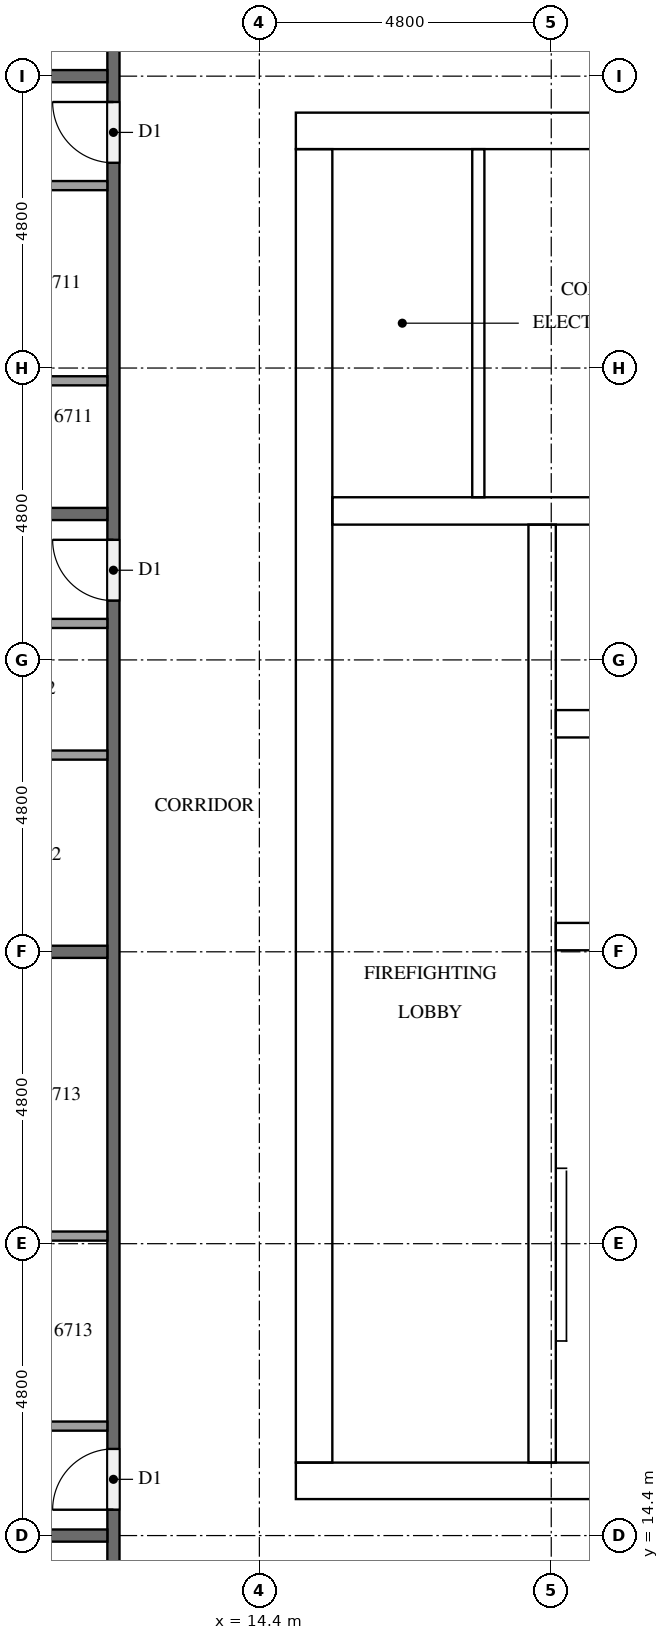
"""IFC4 building model, lengths in metres.
Left out: names, types, materials, properties, quantities, classifications, styles, units other than length and angle.
Written with IfcOpenShell. Run it as: python <this file> out.ifc"""

import sys

from ifc_helpers import new_model, si_unit, direction, frame, frame_2d, origin, place, context, subcontext, project, spatial, rectangle, extrude, element, fill, save


model = new_model("IFC4")
c1 = context("Model", 3, precision=1e-05, world=origin(), true_north=direction((0.0, 1.0)))
c2 = subcontext(c1, "Body", "Model", "MODEL_VIEW")
j1 = project(units=[si_unit("LENGTHUNIT", "METRE"), si_unit("PLANEANGLEUNIT", "RADIAN")], contexts=[c1])
p1 = place(None, origin())
s1 = spatial("IfcSite", under=j1, at=p1, CompositionType="ELEMENT")
p2 = place(p1, origin())
s2 = spatial("IfcBuilding", under=s1, at=p2, CompositionType="ELEMENT")
p3 = place(p2, frame((0.0, 0.0, 256.2)))
s3 = spatial("IfcBuildingStorey", under=s2, at=p3, CompositionType="ELEMENT", Elevation=256.2)
p4 = place(p3, frame((15.0, 15.3, 0.0), z_axis=(0.0, 0.0, 1.0), x_axis=(1.0, 0.0, 0.0)))
e1 = element("IfcWall", 1, at=p4, inside=s3, PredefinedType="SHEAR", context=c2, shape_type="SweptSolid", body=[
    extrude(rectangle(XDim=32.4, YDim=0.6, at=frame_2d((16.2, 0.0))), origin(), (0.0, 0.0, 1.0), 3.2),
])
p5 = place(p4, frame((15.3, 0.0, 0.0)))
e2 = element("IfcOpeningElement", 2, at=p5, cuts=e1, PredefinedType="OPENING", context=c2, shape_type="SweptSolid", body=[
    extrude(rectangle(XDim=1.8, YDim=2.1, at=frame_2d((0.9, 1.05))), frame((0.0, 0.31, 0.0), z_axis=(0.0, -1.0, 0.0), x_axis=(1.0, 0.0, 0.0)), (0.0, 0.0, 1.0), 0.62),
])
p6 = place(p3, frame((15.0, 37.5, 0.0), z_axis=(0.0, 0.0, 1.0), x_axis=(1.0, 0.0, 0.0)))
e3 = element("IfcWall", 3, at=p6, inside=s3, PredefinedType="SHEAR", context=c2, shape_type="SweptSolid", body=[
    extrude(rectangle(XDim=32.4, YDim=0.6, at=frame_2d((16.2, 0.0))), origin(), (0.0, 0.0, 1.0), 3.2),
])
p7 = place(p6, frame((15.3, 0.0, 0.0)))
e4 = element("IfcOpeningElement", 4, at=p7, cuts=e3, PredefinedType="OPENING", context=c2, shape_type="SweptSolid", body=[
    extrude(rectangle(XDim=1.8, YDim=2.1, at=frame_2d((0.9, 1.05))), frame((0.0, 0.31, 0.0), z_axis=(0.0, -1.0, 0.0), x_axis=(1.0, 0.0, 0.0)), (0.0, 0.0, 1.0), 0.62),
])
p8 = place(p6, frame((1.25, 0.0, 0.0)))
e5 = element("IfcOpeningElement", 5, at=p8, cuts=e3, PredefinedType="OPENING", context=c2, shape_type="SweptSolid", body=[
    extrude(rectangle(XDim=1.0, YDim=2.1, at=frame_2d((0.5, 1.05))), frame((0.0, 0.31, 0.0), z_axis=(0.0, -1.0, 0.0), x_axis=(1.0, 0.0, 0.0)), (0.0, 0.0, 1.0), 0.62),
])
p9 = place(p6, frame((4.988, 0.0, 0.0)))
e6 = element("IfcOpeningElement", 6, at=p9, cuts=e3, PredefinedType="OPENING", context=c2, shape_type="SweptSolid", body=[
    extrude(rectangle(XDim=1.0, YDim=2.1, at=frame_2d((0.5, 1.05))), frame((0.0, 0.31, 0.0), z_axis=(0.0, -1.0, 0.0), x_axis=(1.0, 0.0, 0.0)), (0.0, 0.0, 1.0), 0.62),
])
p10 = place(p3, frame((15.3, 15.6, 0.0), z_axis=(0.0, 0.0, 1.0), x_axis=(0.0, 1.0, 0.0)))
e7 = element("IfcWall", 7, at=p10, inside=s3, PredefinedType="SHEAR", context=c2, shape_type="SweptSolid", body=[
    extrude(rectangle(XDim=21.6, YDim=0.6, at=frame_2d((10.8, 0.0))), origin(), (0.0, 0.0, 1.0), 3.2),
])
p11 = place(p10, frame((5.16, 0.0, 0.0)))
e8 = element("IfcOpeningElement", 8, at=p11, cuts=e7, PredefinedType="OPENING", context=c2, shape_type="SweptSolid", body=[
    extrude(rectangle(XDim=1.2, YDim=2.1, at=frame_2d((0.6, 1.05))), frame((0.0, 0.31, 0.0), z_axis=(0.0, -1.0, 0.0), x_axis=(1.0, 0.0, 0.0)), (0.0, 0.0, 1.0), 0.62),
])
p12 = place(p3, frame((19.05, 15.6, 0.0), z_axis=(0.0, 0.0, 1.0), x_axis=(0.0, 1.0, 0.0)))
e9 = element("IfcWall", 9, at=p12, inside=s3, PredefinedType="SHEAR", context=c2, shape_type="SweptSolid", body=[
    extrude(rectangle(XDim=15.425, YDim=0.45, at=frame_2d((7.712, 0.0))), origin(), (0.0, 0.0, 1.0), 3.2),
])
p13 = place(p12, frame((9.85, 0.0, 0.0)))
e10 = element("IfcOpeningElement", 10, at=p13, cuts=e9, PredefinedType="OPENING", context=c2, shape_type="SweptSolid", body=[
    extrude(rectangle(XDim=1.1, YDim=2.1, at=frame_2d((0.55, 1.05))), frame((0.0, 0.235, 0.0), z_axis=(0.0, -1.0, 0.0), x_axis=(1.0, 0.0, 0.0)), (0.0, 0.0, 1.0), 0.47),
])
p14 = place(p12, frame((13.35, 0.0, 0.0)))
e11 = element("IfcOpeningElement", 11, at=p14, cuts=e9, PredefinedType="OPENING", context=c2, shape_type="SweptSolid", body=[
    extrude(rectangle(XDim=1.1, YDim=2.1, at=frame_2d((0.55, 1.05))), frame((0.0, 0.235, 0.0), z_axis=(0.0, -1.0, 0.0), x_axis=(1.0, 0.0, 0.0)), (0.0, 0.0, 1.0), 0.47),
])
p15 = place(p12, frame((0.6, 0.0, 0.0)))
e12 = element("IfcOpeningElement", 12, at=p15, cuts=e9, PredefinedType="OPENING", context=c2, shape_type="SweptSolid", body=[
    extrude(rectangle(XDim=1.2, YDim=2.1, at=frame_2d((0.6, 1.05))), frame((0.0, 0.235, 0.0), z_axis=(0.0, -1.0, 0.0), x_axis=(1.0, 0.0, 0.0)), (0.0, 0.0, 1.0), 0.47),
])
for number, where, z_axis, x_axis in (
    (13, (19.275, 24.25, 0.0), (0.0, 0.0, 1.0), (1.0, 0.0, 0.0)),
    (14, (19.275, 27.75, 0.0), (0.0, 0.0, 1.0), (1.0, 0.0, 0.0)),
):
    element("IfcWall", number, at=place(p3, frame(where, z_axis=z_axis, x_axis=x_axis)), inside=s3, PredefinedType="SHEAR", context=c2, shape_type="SweptSolid", body=[
        extrude(rectangle(XDim=3.6, YDim=0.45, at=frame_2d((1.8, 0.0))), origin(), (0.0, 0.0, 1.0), 3.2),
    ])
p16 = place(p3, frame((15.6, 31.25, 0.0), z_axis=(0.0, 0.0, 1.0), x_axis=(1.0, 0.0, 0.0)))
e15 = element("IfcWall", 15, at=p16, inside=s3, PredefinedType="SHEAR", context=c2, shape_type="SweptSolid", body=[
    extrude(rectangle(XDim=7.275, YDim=0.45, at=frame_2d((3.637, 0.0))), origin(), (0.0, 0.0, 1.0), 3.2),
])
p17 = place(p3, frame((18.001, 31.475, 0.0), z_axis=(0.0, 0.0, 1.0), x_axis=(0.0, 1.0, 0.0)))
e16 = element("IfcWall", 16, at=p17, inside=s3, PredefinedType="PARTITIONING", context=c2, shape_type="SweptSolid", body=[
    extrude(rectangle(XDim=5.725, YDim=0.2, at=frame_2d((2.862, 0.0))), origin(), (0.0, 0.0, 1.0), 3.2),
])
p18 = place(p3, frame((12.0, 12.1, 0.0), z_axis=(0.0, 0.0, 1.0), x_axis=(0.0, 1.0, 0.0)))
e17 = element("IfcWall", 17, at=p18, inside=s3, PredefinedType="PARTITIONING", context=c2, shape_type="SweptSolid", body=[
    extrude(rectangle(XDim=28.6, YDim=0.2, at=frame_2d((14.3, 0.0))), origin(), (0.0, 0.0, 1.0), 3.2),
])
p19 = place(p18, frame((26.725, 0.0, 0.0)))
e18 = element("IfcOpeningElement", 18, at=p19, cuts=e17, PredefinedType="OPENING", context=c2, shape_type="SweptSolid", body=[
    extrude(rectangle(XDim=1.0, YDim=2.1, at=frame_2d((0.5, 1.05))), frame((0.0, 0.11, 0.0), z_axis=(0.0, -1.0, 0.0), x_axis=(1.0, 0.0, 0.0)), (0.0, 0.0, 1.0), 0.22),
])
p20 = place(p18, frame((24.875, 0.0, 0.0)))
e19 = element("IfcOpeningElement", 19, at=p20, cuts=e17, PredefinedType="OPENING", context=c2, shape_type="SweptSolid", body=[
    extrude(rectangle(XDim=1.0, YDim=2.1, at=frame_2d((0.5, 1.05))), frame((0.0, 0.11, 0.0), z_axis=(0.0, -1.0, 0.0), x_axis=(1.0, 0.0, 0.0)), (0.0, 0.0, 1.0), 0.22),
])
p21 = place(p18, frame((17.675, 0.0, 0.0)))
e20 = element("IfcOpeningElement", 20, at=p21, cuts=e17, PredefinedType="OPENING", context=c2, shape_type="SweptSolid", body=[
    extrude(rectangle(XDim=1.0, YDim=2.1, at=frame_2d((0.5, 1.05))), frame((0.0, 0.11, 0.0), z_axis=(0.0, -1.0, 0.0), x_axis=(1.0, 0.0, 0.0)), (0.0, 0.0, 1.0), 0.22),
])
p22 = place(p18, frame((2.725, 0.0, 0.0)))
e21 = element("IfcOpeningElement", 21, at=p22, cuts=e17, PredefinedType="OPENING", context=c2, shape_type="SweptSolid", body=[
    extrude(rectangle(XDim=1.0, YDim=2.1, at=frame_2d((0.5, 1.05))), frame((0.0, 0.11, 0.0), z_axis=(0.0, -1.0, 0.0), x_axis=(1.0, 0.0, 0.0)), (0.0, 0.0, 1.0), 0.22),
])
p23 = place(p18, frame((0.875, 0.0, 0.0)))
e22 = element("IfcOpeningElement", 22, at=p23, cuts=e17, PredefinedType="OPENING", context=c2, shape_type="SweptSolid", body=[
    extrude(rectangle(XDim=1.0, YDim=2.1, at=frame_2d((0.5, 1.05))), frame((0.0, 0.11, 0.0), z_axis=(0.0, -1.0, 0.0), x_axis=(1.0, 0.0, 0.0)), (0.0, 0.0, 1.0), 0.22),
])
p24 = place(p3, frame((0.275, 38.4, 0.0), z_axis=(0.0, 0.0, 1.0), x_axis=(1.0, 0.0, 0.0)))
e23 = element("IfcWall", 23, at=p24, inside=s3, PredefinedType="PARTITIONING", context=c2, shape_type="SweptSolid", body=[
    extrude(rectangle(XDim=11.625, YDim=0.2, at=frame_2d((5.812, 0.0))), origin(), (0.0, 0.0, 1.0), 3.2),
])
for number, where, z_axis, x_axis in (
    (24, (0.1, 31.2, 0.0), (0.0, 0.0, 1.0), (1.0, 0.0, 0.0)),
    (25, (0.1, 24.0, 0.0), (0.0, 0.0, 1.0), (1.0, 0.0, 0.0)),
    (26, (0.1, 14.4, 0.0), (0.0, 0.0, 1.0), (1.0, 0.0, 0.0)),
):
    element("IfcWall", number, at=place(p3, frame(where, z_axis=z_axis, x_axis=x_axis)), inside=s3, PredefinedType="PARTITIONING", context=c2, shape_type="SweptSolid", body=[
        extrude(rectangle(XDim=11.8, YDim=0.2, at=frame_2d((5.9, 0.0))), origin(), (0.0, 0.0, 1.0), 3.2),
    ])
p25 = place(p3, frame((11.9, 33.39, 0.0), z_axis=(0.0, 0.0, 1.0), x_axis=(-1.0, 0.0, 0.0)))
e27 = element("IfcWall", 27, at=p25, inside=s3, PredefinedType="PARTITIONING", context=c2, shape_type="SweptSolid", body=[
    extrude(rectangle(XDim=2.975, YDim=0.15, at=frame_2d((1.487, 0.0))), origin(), (0.0, 0.0, 1.0), 3.2),
])
p26 = place(p3, frame((11.9, 36.6, 0.0), z_axis=(0.0, 0.0, 1.0), x_axis=(-1.0, 0.0, 0.0)))
e28 = element("IfcWall", 28, at=p26, inside=s3, PredefinedType="PARTITIONING", context=c2, shape_type="SweptSolid", body=[
    extrude(rectangle(XDim=3.125, YDim=0.15, at=frame_2d((1.562, 0.0))), origin(), (0.0, 0.0, 1.0), 3.2),
])
p27 = place(p3, frame((11.9, 27.235, 0.0), z_axis=(0.0, 0.0, 1.0), x_axis=(-1.0, 0.0, 0.0)))
e29 = element("IfcWall", 29, at=p27, inside=s3, PredefinedType="PARTITIONING", context=c2, shape_type="SweptSolid", body=[
    extrude(rectangle(XDim=4.175, YDim=0.15, at=frame_2d((2.087, 0.0))), origin(), (0.0, 0.0, 1.0), 3.2),
])
p28 = place(p3, frame((11.9, 29.4, 0.0), z_axis=(0.0, 0.0, 1.0), x_axis=(-1.0, 0.0, 0.0)))
e30 = element("IfcWall", 30, at=p28, inside=s3, PredefinedType="PARTITIONING", context=c2, shape_type="SweptSolid", body=[
    extrude(rectangle(XDim=4.325, YDim=0.15, at=frame_2d((2.163, 0.0))), origin(), (0.0, 0.0, 1.0), 3.2),
])
p29 = place(p3, frame((11.9, 19.325, 0.0), z_axis=(0.0, 0.0, 1.0), x_axis=(-1.0, 0.0, 0.0)))
e31 = element("IfcWall", 31, at=p29, inside=s3, PredefinedType="PARTITIONING", context=c2, shape_type="SweptSolid", body=[
    extrude(rectangle(XDim=2.975, YDim=0.15, at=frame_2d((1.487, 0.0))), origin(), (0.0, 0.0, 1.0), 3.2),
])
p30 = place(p3, frame((11.9, 16.2, 0.0), z_axis=(0.0, 0.0, 1.0), x_axis=(-1.0, 0.0, 0.0)))
e32 = element("IfcWall", 32, at=p30, inside=s3, PredefinedType="PARTITIONING", context=c2, shape_type="SweptSolid", body=[
    extrude(rectangle(XDim=3.125, YDim=0.15, at=frame_2d((1.562, 0.0))), origin(), (0.0, 0.0, 1.0), 3.2),
])
p31 = place(p13, origin())
e33 = element("IfcDoor", 33, at=p31, inside=s3, OperationType="DOUBLE_DOOR_SLIDING", PredefinedType="DOOR", context=c2, shape_type="SweptSolid", body=[
    extrude(rectangle(XDim=1.1, YDim=2.1, at=frame_2d((0.55, 1.05))), frame((0.0, 0.025, 0.0), z_axis=(0.0, -1.0, 0.0), x_axis=(1.0, 0.0, 0.0)), (0.0, 0.0, 1.0), 0.05),
])
fill(e10, e33)
p32 = place(p14, origin())
e34 = element("IfcDoor", 34, at=p32, inside=s3, OperationType="DOUBLE_DOOR_SLIDING", PredefinedType="DOOR", context=c2, shape_type="SweptSolid", body=[
    extrude(rectangle(XDim=1.1, YDim=2.1, at=frame_2d((0.55, 1.05))), frame((0.0, 0.025, 0.0), z_axis=(0.0, -1.0, 0.0), x_axis=(1.0, 0.0, 0.0)), (0.0, 0.0, 1.0), 0.05),
])
fill(e11, e34)
p33 = place(p15, frame((1.2, 0.0, 0.0), z_axis=(0.0, 0.0, 1.0), x_axis=(-1.0, 0.0, 0.0)))
e35 = element("IfcDoor", 35, at=p33, inside=s3, OperationType="SINGLE_SWING_LEFT", PredefinedType="DOOR", context=c2, shape_type="SweptSolid", body=[
    extrude(rectangle(XDim=1.2, YDim=2.1, at=frame_2d((0.6, 1.05))), frame((0.0, 0.025, 0.0), z_axis=(0.0, -1.0, 0.0), x_axis=(1.0, 0.0, 0.0)), (0.0, 0.0, 1.0), 0.05),
])
fill(e12, e35)
p34 = place(p11, frame((1.2, 0.0, 0.0), z_axis=(0.0, 0.0, 1.0), x_axis=(-1.0, 0.0, 0.0)))
e36 = element("IfcDoor", 36, at=p34, inside=s3, OperationType="SINGLE_SWING_RIGHT", PredefinedType="DOOR", context=c2, shape_type="SweptSolid", body=[
    extrude(rectangle(XDim=1.2, YDim=2.1, at=frame_2d((0.6, 1.05))), frame((0.0, 0.025, 0.0), z_axis=(0.0, -1.0, 0.0), x_axis=(1.0, 0.0, 0.0)), (0.0, 0.0, 1.0), 0.05),
])
fill(e8, e36)
p35 = place(p8, origin())
e37 = element("IfcDoor", 37, at=p35, inside=s3, OperationType="SINGLE_SWING_RIGHT", PredefinedType="DOOR", context=c2, shape_type="SweptSolid", body=[
    extrude(rectangle(XDim=1.0, YDim=2.1, at=frame_2d((0.5, 1.05))), frame((0.0, 0.025, 0.0), z_axis=(0.0, -1.0, 0.0), x_axis=(1.0, 0.0, 0.0)), (0.0, 0.0, 1.0), 0.05),
])
fill(e5, e37)
p36 = place(p20, origin())
e38 = element("IfcDoor", 38, at=p36, inside=s3, OperationType="SINGLE_SWING_RIGHT", PredefinedType="DOOR", context=c2, shape_type="SweptSolid", body=[
    extrude(rectangle(XDim=1.0, YDim=2.1, at=frame_2d((0.5, 1.05))), frame((0.0, 0.025, 0.0), z_axis=(0.0, -1.0, 0.0), x_axis=(1.0, 0.0, 0.0)), (0.0, 0.0, 1.0), 0.05),
])
fill(e19, e38)
p37 = place(p21, origin())
e39 = element("IfcDoor", 39, at=p37, inside=s3, OperationType="SINGLE_SWING_RIGHT", PredefinedType="DOOR", context=c2, shape_type="SweptSolid", body=[
    extrude(rectangle(XDim=1.0, YDim=2.1, at=frame_2d((0.5, 1.05))), frame((0.0, 0.025, 0.0), z_axis=(0.0, -1.0, 0.0), x_axis=(1.0, 0.0, 0.0)), (0.0, 0.0, 1.0), 0.05),
])
fill(e20, e39)
p38 = place(p22, origin())
e40 = element("IfcDoor", 40, at=p38, inside=s3, OperationType="SINGLE_SWING_LEFT", PredefinedType="DOOR", context=c2, shape_type="SweptSolid", body=[
    extrude(rectangle(XDim=1.0, YDim=2.1, at=frame_2d((0.5, 1.05))), frame((0.0, 0.025, 0.0), z_axis=(0.0, -1.0, 0.0), x_axis=(1.0, 0.0, 0.0)), (0.0, 0.0, 1.0), 0.05),
])
fill(e21, e40)
save(model, sys.argv[1])
